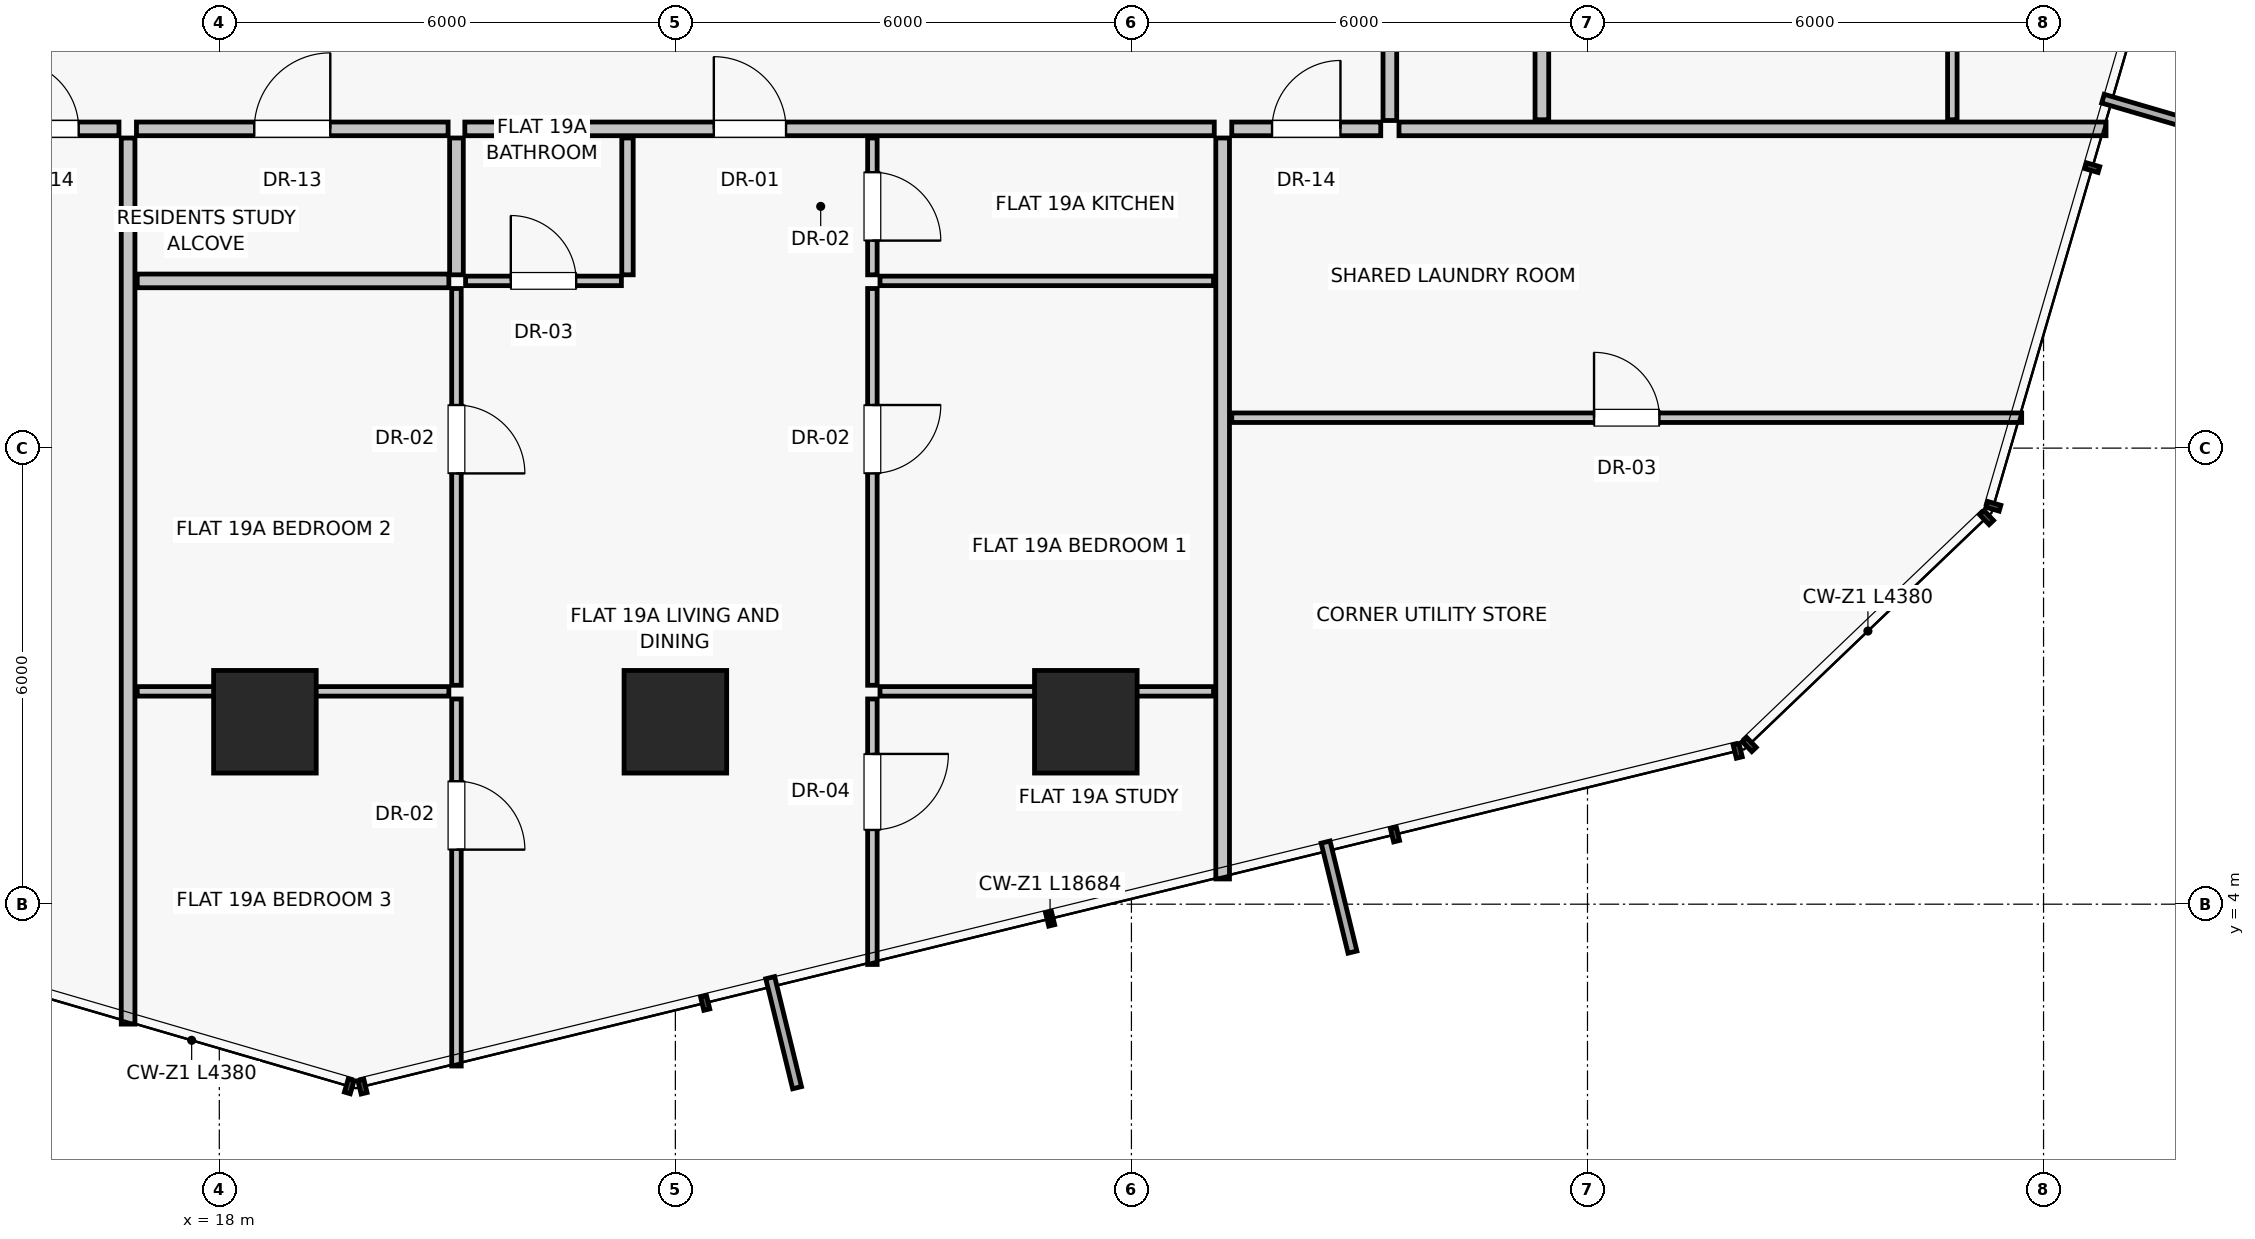
"""IFC4 building model, lengths in metres.
Left out: names, types, materials, properties, quantities, classifications, styles, units other than length and angle.
Written with IfcOpenShell. Run it as: python <this file> out.ifc"""

import sys

from ifc_helpers import new_model, si_unit, direction, frame, frame_2d, origin, origin_2d, place, context, subcontext, project, spatial, rectangle, extrude, source, transform, mapped, element, fill, save


model = new_model("IFC4")
c1 = context("Model", 3, precision=1e-05, world=origin(), true_north=direction((0.0, 1.0)))
c2 = subcontext(c1, "Body", "Model", "MODEL_VIEW")
j1 = project(units=[si_unit("LENGTHUNIT", "METRE"), si_unit("PLANEANGLEUNIT", "RADIAN")], contexts=[c1])
p1 = place(None, origin())
s1 = spatial("IfcSite", under=j1, at=p1, CompositionType="ELEMENT")
p2 = place(p1, origin())
s2 = spatial("IfcBuilding", under=s1, at=p2, CompositionType="ELEMENT")
p3 = place(p2, frame((0.0, 0.0, 70.6)))
s3 = spatial("IfcBuildingStorey", under=s2, at=p3, CompositionType="ELEMENT", Elevation=70.6)
for number, where, z_axis, x_axis in (
    (1, (18.6, 6.4, 0.0), (0.0, 0.0, 1.0), (1.0, 0.0, 0.0)),
    (2, (24.0, 6.4, 0.0), (0.0, 0.0, 1.0), (1.0, 0.0, 0.0)),
    (3, (29.4, 6.4, 0.0), (0.0, 0.0, 1.0), (1.0, 0.0, 0.0)),
):
    element("IfcColumn", number, at=place(p3, frame(where, z_axis=z_axis, x_axis=x_axis)), inside=s3, PredefinedType="COLUMN", context=c2, shape_type="SweptSolid", body=[
        extrude(rectangle(XDim=1.35, YDim=1.35, at=origin_2d()), origin(), (0.0, 0.0, 1.0), 3.25),
    ])
p4 = place(p3, frame((16.8, 14.08, 0.0), z_axis=(0.0, 0.0, 1.0), x_axis=(0.0, -1.0, 0.0)))
e4 = element("IfcWall", 4, at=p4, inside=s3, PredefinedType="PARTITIONING", context=c2, shape_type="SweptSolid", body=[
    extrude(rectangle(XDim=11.658, YDim=0.18, at=frame_2d((5.829, 0.0))), origin(), (0.0, 0.0, 1.0), 3.0),
])
p5 = place(p3, frame((31.2, 14.08, 0.0), z_axis=(0.0, 0.0, 1.0), x_axis=(0.0, -1.0, 0.0)))
e5 = element("IfcWall", 5, at=p5, inside=s3, PredefinedType="PARTITIONING", context=c2, shape_type="SweptSolid", body=[
    extrude(rectangle(XDim=9.748, YDim=0.18, at=frame_2d((4.874, 0.0))), origin(), (0.0, 0.0, 1.0), 3.0),
])
p6 = place(p3, frame((16.91, 14.2, 0.0), z_axis=(0.0, 0.0, 1.0), x_axis=(1.0, 0.0, 0.0)))
e6 = element("IfcWall", 6, at=p6, inside=s3, PredefinedType="PARTITIONING", context=c2, shape_type="SweptSolid", body=[
    extrude(rectangle(XDim=4.1, YDim=0.18, at=frame_2d((2.05, 0.0))), origin(), (0.0, 0.0, 1.0), 3.0),
])
p7 = place(p6, frame((1.55, 0.0, 0.0)))
e7 = element("IfcOpeningElement", 7, at=p7, cuts=e6, PredefinedType="OPENING", context=c2, shape_type="SweptSolid", body=[
    extrude(rectangle(XDim=1.0, YDim=2.01, at=frame_2d((0.5, 1.005))), frame((0.0, 0.1, 0.0), z_axis=(0.0, -1.0, 0.0), x_axis=(1.0, 0.0, 0.0)), (0.0, 0.0, 1.0), 0.2),
])
p8 = place(p3, frame((21.23, 14.2, 0.0), z_axis=(0.0, 0.0, 1.0), x_axis=(1.0, 0.0, 0.0)))
e8 = element("IfcWall", 8, at=p8, inside=s3, PredefinedType="PARTITIONING", context=c2, shape_type="SweptSolid", body=[
    extrude(rectangle(XDim=9.86, YDim=0.18, at=frame_2d((4.93, 0.0))), origin(), (0.0, 0.0, 1.0), 3.0),
])
p9 = place(p8, frame((3.276, 0.0, 0.0)))
e9 = element("IfcOpeningElement", 9, at=p9, cuts=e8, PredefinedType="OPENING", context=c2, shape_type="SweptSolid", body=[
    extrude(rectangle(XDim=0.95, YDim=2.02, at=frame_2d((0.475, 1.01))), frame((0.0, 0.1, 0.0), z_axis=(0.0, -1.0, 0.0), x_axis=(1.0, 0.0, 0.0)), (0.0, 0.0, 1.0), 0.2),
])
p10 = place(p3, frame((16.92, 6.8, 0.0), z_axis=(0.0, 0.0, 1.0), x_axis=(1.0, 0.0, 0.0)))
e10 = element("IfcWall", 10, at=p10, inside=s3, PredefinedType="PARTITIONING", context=c2, shape_type="SweptSolid", body=[
    extrude(rectangle(XDim=4.1, YDim=0.125, at=frame_2d((2.05, 0.0))), origin(), (0.0, 0.0, 1.0), 2.1),
])
p11 = place(p3, frame((21.12, 6.7, 0.0), z_axis=(0.0, 0.0, 1.0), x_axis=(0.0, -1.0, 0.0)))
e11 = element("IfcWall", 11, at=p11, inside=s3, PredefinedType="PARTITIONING", context=c2, shape_type="SweptSolid", body=[
    extrude(rectangle(XDim=4.829, YDim=0.125, at=frame_2d((2.415, 0.0))), origin(), (0.0, 0.0, 1.0), 3.0),
])
p12 = place(p11, frame((1.082, 0.0, 0.0)))
e12 = element("IfcOpeningElement", 12, at=p12, cuts=e11, PredefinedType="OPENING", context=c2, shape_type="SweptSolid", body=[
    extrude(rectangle(XDim=0.9, YDim=2.01, at=frame_2d((0.45, 1.005))), frame((0.0, 0.073, 0.0), z_axis=(0.0, -1.0, 0.0), x_axis=(1.0, 0.0, 0.0)), (0.0, 0.0, 1.0), 0.145),
])
p13 = place(p3, frame((26.692, 6.8, 0.0), z_axis=(0.0, 0.0, 1.0), x_axis=(1.0, 0.0, 0.0)))
e13 = element("IfcWall", 13, at=p13, inside=s3, PredefinedType="PARTITIONING", context=c2, shape_type="SweptSolid", body=[
    extrude(rectangle(XDim=4.388, YDim=0.125, at=frame_2d((2.194, 0.0))), origin(), (0.0, 0.0, 1.0), 2.1),
])
p14 = place(p3, frame((26.592, 6.7, 0.0), z_axis=(0.0, 0.0, 1.0), x_axis=(0.0, -1.0, 0.0)))
e14 = element("IfcWall", 14, at=p14, inside=s3, PredefinedType="PARTITIONING", context=c2, shape_type="SweptSolid", body=[
    extrude(rectangle(XDim=3.493, YDim=0.125, at=frame_2d((1.747, 0.0))), origin(), (0.0, 0.0, 1.0), 3.0),
])
p15 = place(p14, frame((0.723, 0.0, 0.0)))
e15 = element("IfcOpeningElement", 15, at=p15, cuts=e14, PredefinedType="OPENING", context=c2, shape_type="SweptSolid", body=[
    extrude(rectangle(XDim=1.0, YDim=2.01, at=frame_2d((0.5, 1.005))), frame((0.0, 0.073, 0.0), z_axis=(0.0, -1.0, 0.0), x_axis=(1.0, 0.0, 0.0)), (0.0, 0.0, 1.0), 0.145),
])
p16 = place(p3, frame((16.92, 12.2, 0.0), z_axis=(0.0, 0.0, 1.0), x_axis=(1.0, 0.0, 0.0)))
e16 = element("IfcWall", 16, at=p16, inside=s3, PredefinedType="PARTITIONING", context=c2, shape_type="SweptSolid", body=[
    extrude(rectangle(XDim=4.1, YDim=0.18, at=frame_2d((2.05, 0.0))), origin(), (0.0, 0.0, 1.0), 3.0),
])
p17 = place(p3, frame((21.12, 14.08, 0.0), z_axis=(0.0, 0.0, 1.0), x_axis=(0.0, -1.0, 0.0)))
e17 = element("IfcWall", 17, at=p17, inside=s3, PredefinedType="PARTITIONING", context=c2, shape_type="SweptSolid", body=[
    extrude(rectangle(XDim=1.8, YDim=0.18, at=frame_2d((0.9, 0.0))), origin(), (0.0, 0.0, 1.0), 3.0),
])
p18 = place(p3, frame((21.12, 12.1, 0.0), z_axis=(0.0, 0.0, 1.0), x_axis=(0.0, -1.0, 0.0)))
e18 = element("IfcWall", 18, at=p18, inside=s3, PredefinedType="PARTITIONING", context=c2, shape_type="SweptSolid", body=[
    extrude(rectangle(XDim=5.22, YDim=0.125, at=frame_2d((2.61, 0.0))), origin(), (0.0, 0.0, 1.0), 3.0),
])
p19 = place(p18, frame((1.533, 0.0, 0.0)))
e19 = element("IfcOpeningElement", 19, at=p19, cuts=e18, PredefinedType="OPENING", context=c2, shape_type="SweptSolid", body=[
    extrude(rectangle(XDim=0.9, YDim=2.01, at=frame_2d((0.45, 1.005))), frame((0.0, 0.073, 0.0), z_axis=(0.0, -1.0, 0.0), x_axis=(1.0, 0.0, 0.0)), (0.0, 0.0, 1.0), 0.145),
])
p20 = place(p3, frame((23.37, 14.08, 0.0), z_axis=(0.0, 0.0, 1.0), x_axis=(0.0, -1.0, 0.0)))
e20 = element("IfcWall", 20, at=p20, inside=s3, PredefinedType="PARTITIONING", context=c2, shape_type="SweptSolid", body=[
    extrude(rectangle(XDim=1.8, YDim=0.15, at=frame_2d((0.9, 0.0))), origin(), (0.0, 0.0, 1.0), 3.0),
])
p21 = place(p3, frame((21.24, 12.2, 0.0), z_axis=(0.0, 0.0, 1.0), x_axis=(1.0, 0.0, 0.0)))
e21 = element("IfcWall", 21, at=p21, inside=s3, PredefinedType="PARTITIONING", context=c2, shape_type="SweptSolid", body=[
    extrude(rectangle(XDim=2.05, YDim=0.125, at=frame_2d((1.025, 0.0))), origin(), (0.0, 0.0, 1.0), 3.0),
])
p22 = place(p21, frame((0.595, 0.0, 0.0)))
e22 = element("IfcOpeningElement", 22, at=p22, cuts=e21, PredefinedType="OPENING", context=c2, shape_type="SweptSolid", body=[
    extrude(rectangle(XDim=0.86, YDim=2.01, at=frame_2d((0.43, 1.005))), frame((0.0, 0.073, 0.0), z_axis=(0.0, -1.0, 0.0), x_axis=(1.0, 0.0, 0.0)), (0.0, 0.0, 1.0), 0.145),
])
p23 = place(p3, frame((26.592, 14.08, 0.0), z_axis=(0.0, 0.0, 1.0), x_axis=(0.0, -1.0, 0.0)))
e23 = element("IfcWall", 23, at=p23, inside=s3, PredefinedType="PARTITIONING", context=c2, shape_type="SweptSolid", body=[
    extrude(rectangle(XDim=1.8, YDim=0.125, at=frame_2d((0.9, 0.0))), origin(), (0.0, 0.0, 1.0), 3.0),
])
p24 = place(p23, frame((0.45, 0.0, 0.0)))
e24 = element("IfcOpeningElement", 24, at=p24, cuts=e23, PredefinedType="OPENING", context=c2, shape_type="SweptSolid", body=[
    extrude(rectangle(XDim=0.9, YDim=2.01, at=frame_2d((0.45, 1.005))), frame((0.0, 0.073, 0.0), z_axis=(0.0, -1.0, 0.0), x_axis=(1.0, 0.0, 0.0)), (0.0, 0.0, 1.0), 0.145),
])
p25 = place(p3, frame((26.692, 12.2, 0.0), z_axis=(0.0, 0.0, 1.0), x_axis=(1.0, 0.0, 0.0)))
e25 = element("IfcWall", 25, at=p25, inside=s3, PredefinedType="PARTITIONING", context=c2, shape_type="SweptSolid", body=[
    extrude(rectangle(XDim=4.388, YDim=0.125, at=frame_2d((2.194, 0.0))), origin(), (0.0, 0.0, 1.0), 3.0),
])
p26 = place(p3, frame((26.592, 12.1, 0.0), z_axis=(0.0, 0.0, 1.0), x_axis=(0.0, -1.0, 0.0)))
e26 = element("IfcWall", 26, at=p26, inside=s3, PredefinedType="PARTITIONING", context=c2, shape_type="SweptSolid", body=[
    extrude(rectangle(XDim=5.22, YDim=0.125, at=frame_2d((2.61, 0.0))), origin(), (0.0, 0.0, 1.0), 3.0),
])
p27 = place(p26, frame((1.533, 0.0, 0.0)))
e27 = element("IfcOpeningElement", 27, at=p27, cuts=e26, PredefinedType="OPENING", context=c2, shape_type="SweptSolid", body=[
    extrude(rectangle(XDim=0.9, YDim=2.01, at=frame_2d((0.45, 1.005))), frame((0.0, 0.073, 0.0), z_axis=(0.0, -1.0, 0.0), x_axis=(1.0, 0.0, 0.0)), (0.0, 0.0, 1.0), 0.145),
])
p28 = place(p3, frame((33.52, 14.2, 0.0), z_axis=(0.0, 0.0, 1.0), x_axis=(1.0, 0.0, 0.0)))
e28 = element("IfcWall", 28, at=p28, inside=s3, PredefinedType="PARTITIONING", context=c2, shape_type="SweptSolid", body=[
    extrude(rectangle(XDim=9.302, YDim=0.18, at=frame_2d((4.651, 0.0))), origin(), (0.0, 0.0, 1.0), 3.0),
])
p29 = place(p3, frame((33.4, 14.31, 0.0), z_axis=(0.0, 0.0, 1.0), x_axis=(0.0, 1.0, 0.0)))
e29 = element("IfcWall", 29, at=p29, inside=s3, PredefinedType="PARTITIONING", context=c2, shape_type="SweptSolid", body=[
    extrude(rectangle(XDim=4.18, YDim=0.18, at=frame_2d((2.09, 0.0))), origin(), (0.0, 0.0, 1.0), 3.0),
])
p30 = place(p29, frame((1.59, 0.0, 0.0)))
e30 = element("IfcOpeningElement", 30, at=p30, cuts=e29, PredefinedType="OPENING", context=c2, shape_type="SweptSolid", body=[
    extrude(rectangle(XDim=1.0, YDim=2.01, at=frame_2d((0.5, 1.005))), frame((0.0, 0.1, 0.0), z_axis=(0.0, -1.0, 0.0), x_axis=(1.0, 0.0, 0.0)), (0.0, 0.0, 1.0), 0.2),
])
p31 = place(p3, frame((40.8, 14.32, 0.0), z_axis=(0.0, 0.0, 1.0), x_axis=(0.0, 1.0, 0.0)))
e31 = element("IfcWall", 31, at=p31, inside=s3, PredefinedType="PARTITIONING", context=c2, shape_type="SweptSolid", body=[
    extrude(rectangle(XDim=4.18, YDim=0.125, at=frame_2d((2.09, 0.0))), origin(), (0.0, 0.0, 1.0), 3.0),
])
p32 = place(p3, frame((35.4, 14.32, 0.0), z_axis=(0.0, 0.0, 1.0), x_axis=(0.0, 1.0, 0.0)))
e32 = element("IfcWall", 32, at=p32, inside=s3, PredefinedType="PARTITIONING", context=c2, shape_type="SweptSolid", body=[
    extrude(rectangle(XDim=4.18, YDim=0.18, at=frame_2d((2.09, 0.0))), origin(), (0.0, 0.0, 1.0), 3.0),
])
p33 = place(p3, frame((14.72, 14.2, 0.0), z_axis=(0.0, 0.0, 1.0), x_axis=(1.0, 0.0, 0.0)))
e33 = element("IfcWall", 33, at=p33, inside=s3, PredefinedType="PARTITIONING", context=c2, shape_type="SweptSolid", body=[
    extrude(rectangle(XDim=1.96, YDim=0.18, at=frame_2d((0.98, 0.0))), origin(), (0.0, 0.0, 1.0), 3.0),
])
p34 = place(p33, frame((0.53, 0.0, 0.0)))
e34 = element("IfcOpeningElement", 34, at=p34, cuts=e33, PredefinedType="OPENING", context=c2, shape_type="SweptSolid", body=[
    extrude(rectangle(XDim=0.9, YDim=2.01, at=frame_2d((0.45, 1.005))), frame((0.0, 0.1, 0.0), z_axis=(0.0, -1.0, 0.0), x_axis=(1.0, 0.0, 0.0)), (0.0, 0.0, 1.0), 0.2),
])
p35 = place(p3, frame((31.32, 14.2, 0.0), z_axis=(0.0, 0.0, 1.0), x_axis=(1.0, 0.0, 0.0)))
e35 = element("IfcWall", 35, at=p35, inside=s3, PredefinedType="PARTITIONING", context=c2, shape_type="SweptSolid", body=[
    extrude(rectangle(XDim=1.96, YDim=0.18, at=frame_2d((0.98, 0.0))), origin(), (0.0, 0.0, 1.0), 3.0),
])
p36 = place(p35, frame((0.53, 0.0, 0.0)))
e36 = element("IfcOpeningElement", 36, at=p36, cuts=e35, PredefinedType="OPENING", context=c2, shape_type="SweptSolid", body=[
    extrude(rectangle(XDim=0.9, YDim=2.01, at=frame_2d((0.45, 1.005))), frame((0.0, 0.1, 0.0), z_axis=(0.0, -1.0, 0.0), x_axis=(1.0, 0.0, 0.0)), (0.0, 0.0, 1.0), 0.2),
])
p37 = place(p3, frame((31.32, 10.4, 0.0), z_axis=(0.0, 0.0, 1.0), x_axis=(1.0, 0.0, 0.0)))
e37 = element("IfcWall", 37, at=p37, inside=s3, PredefinedType="PARTITIONING", context=c2, shape_type="SweptSolid", body=[
    extrude(rectangle(XDim=10.392, YDim=0.125, at=frame_2d((5.196, 0.0))), origin(), (0.0, 0.0, 1.0), 3.0),
])
p38 = place(p37, frame((4.766, 0.0, 0.0)))
e38 = element("IfcOpeningElement", 38, at=p38, cuts=e37, PredefinedType="OPENING", context=c2, shape_type="SweptSolid", body=[
    extrude(rectangle(XDim=0.86, YDim=2.01, at=frame_2d((0.43, 1.005))), frame((0.0, 0.073, 0.0), z_axis=(0.0, -1.0, 0.0), x_axis=(1.0, 0.0, 0.0)), (0.0, 0.0, 1.0), 0.145),
])
m1 = source(origin(), c2, "Body", "SweptSolid", [
    extrude(rectangle(XDim=1.0, YDim=2.01, at=frame_2d((0.5, 1.005))), frame((0.0, 0.025, 0.0), z_axis=(0.0, -1.0, 0.0), x_axis=(1.0, 0.0, 0.0)), (0.0, 0.0, 1.0), 0.05),
])
p39 = place(p7, origin())
e39 = element("IfcDoor", 39, at=p39, inside=s3, OperationType="SINGLE_SWING_RIGHT", PredefinedType="DOOR", context=c2, shape_type="MappedRepresentation", body=[
    mapped(m1, transform((0.0, 0.0, 0.0), scale=1.0)),
])
fill(e7, e39)
m2 = source(origin(), c2, "Body", "SweptSolid", [
    extrude(rectangle(XDim=0.95, YDim=2.02, at=frame_2d((0.475, 1.01))), frame((0.0, 0.025, 0.0), z_axis=(0.0, -1.0, 0.0), x_axis=(1.0, 0.0, 0.0)), (0.0, 0.0, 1.0), 0.05),
])
p40 = place(p9, origin())
e40 = element("IfcDoor", 40, at=p40, inside=s3, OperationType="SINGLE_SWING_LEFT", PredefinedType="DOOR", context=c2, shape_type="MappedRepresentation", body=[
    mapped(m2, transform((0.0, 0.0, 0.0), scale=1.0)),
])
fill(e9, e40)
m3 = source(origin(), c2, "Body", "SweptSolid", [
    extrude(rectangle(XDim=0.9, YDim=2.01, at=frame_2d((0.45, 1.005))), frame((0.0, 0.025, 0.0), z_axis=(0.0, -1.0, 0.0), x_axis=(1.0, 0.0, 0.0)), (0.0, 0.0, 1.0), 0.05),
])
p41 = place(p12, origin())
e41 = element("IfcDoor", 41, at=p41, inside=s3, OperationType="SINGLE_SWING_RIGHT", PredefinedType="DOOR", context=c2, shape_type="MappedRepresentation", body=[
    mapped(m3, transform((0.0, 0.0, 0.0), scale=1.0)),
])
fill(e12, e41)
p42 = place(p15, origin())
e42 = element("IfcDoor", 42, at=p42, inside=s3, OperationType="SINGLE_SWING_LEFT", PredefinedType="DOOR", context=c2, shape_type="MappedRepresentation", body=[
    mapped(m1, transform((0.0, 0.0, 0.0), scale=1.0)),
])
fill(e15, e42)
p43 = place(p19, origin())
e43 = element("IfcDoor", 43, at=p43, inside=s3, OperationType="SINGLE_SWING_RIGHT", PredefinedType="DOOR", context=c2, shape_type="MappedRepresentation", body=[
    mapped(m3, transform((0.0, 0.0, 0.0), scale=1.0)),
])
fill(e19, e43)
m4 = source(origin(), c2, "Body", "SweptSolid", [
    extrude(rectangle(XDim=0.86, YDim=2.01, at=frame_2d((0.43, 1.005))), frame((0.0, 0.025, 0.0), z_axis=(0.0, -1.0, 0.0), x_axis=(1.0, 0.0, 0.0)), (0.0, 0.0, 1.0), 0.05),
])
p44 = place(p22, origin())
e44 = element("IfcDoor", 44, at=p44, inside=s3, OperationType="SINGLE_SWING_LEFT", PredefinedType="DOOR", context=c2, shape_type="MappedRepresentation", body=[
    mapped(m4, transform((0.0, 0.0, 0.0), scale=1.0)),
])
fill(e22, e44)
p45 = place(p24, origin())
e45 = element("IfcDoor", 45, at=p45, inside=s3, OperationType="SINGLE_SWING_RIGHT", PredefinedType="DOOR", context=c2, shape_type="MappedRepresentation", body=[
    mapped(m3, transform((0.0, 0.0, 0.0), scale=1.0)),
])
fill(e24, e45)
p46 = place(p27, origin())
e46 = element("IfcDoor", 46, at=p46, inside=s3, OperationType="SINGLE_SWING_LEFT", PredefinedType="DOOR", context=c2, shape_type="MappedRepresentation", body=[
    mapped(m3, transform((0.0, 0.0, 0.0), scale=1.0)),
])
fill(e27, e46)
p47 = place(p34, origin())
e47 = element("IfcDoor", 47, at=p47, inside=s3, OperationType="SINGLE_SWING_LEFT", PredefinedType="DOOR", context=c2, shape_type="MappedRepresentation", body=[
    mapped(m3, transform((0.0, 0.0, 0.0), scale=1.0)),
])
fill(e34, e47)
p48 = place(p36, origin())
e48 = element("IfcDoor", 48, at=p48, inside=s3, OperationType="SINGLE_SWING_RIGHT", PredefinedType="DOOR", context=c2, shape_type="MappedRepresentation", body=[
    mapped(m3, transform((0.0, 0.0, 0.0), scale=1.0)),
])
fill(e36, e48)
p49 = place(p38, origin())
e49 = element("IfcDoor", 49, at=p49, inside=s3, OperationType="SINGLE_SWING_LEFT", PredefinedType="DOOR", context=c2, shape_type="MappedRepresentation", body=[
    mapped(m4, transform((0.0, 0.0, 0.0), scale=1.0)),
])
fill(e38, e49)
save(model, sys.argv[1])
